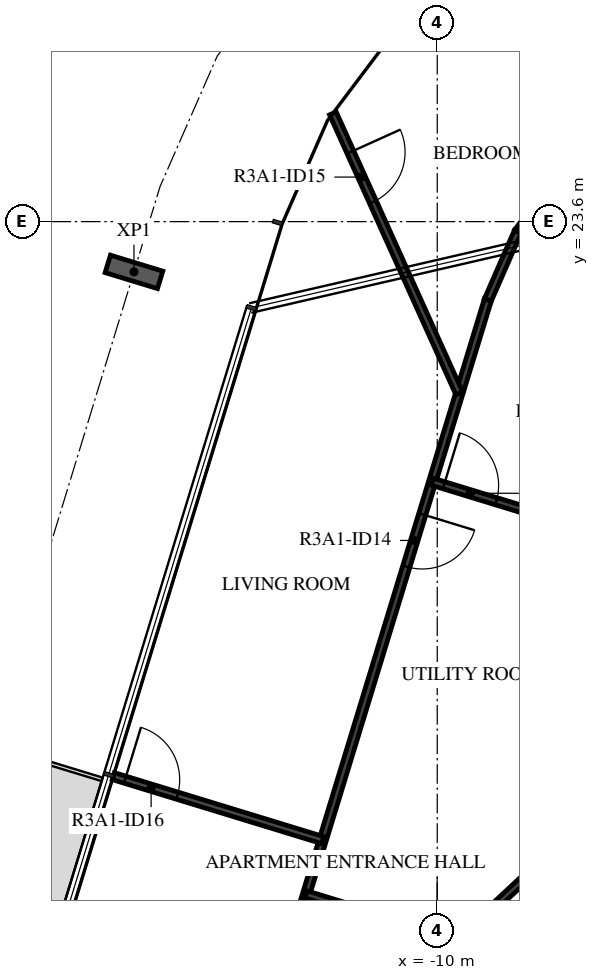
"""IFC4 building model, lengths in metres.
Left out: names, types, materials, properties, quantities, classifications, styles, units other than length and angle.
Written with IfcOpenShell. Run it as: python <this file> out.ifc"""

import sys

from ifc_helpers import new_model, si_unit, direction, frame, frame_2d, origin, origin_2d, place, context, subcontext, project, spatial, rectangle, i_section, extrude, element, fill, save


model = new_model("IFC4")
c1 = context("Model", 3, precision=1e-05, world=origin(), true_north=direction((0.0, 1.0)))
c2 = subcontext(c1, "Body", "Model", "MODEL_VIEW")
j1 = project(units=[si_unit("LENGTHUNIT", "METRE"), si_unit("PLANEANGLEUNIT", "RADIAN")], contexts=[c1])
p1 = place(None, origin())
s1 = spatial("IfcSite", under=j1, at=p1, CompositionType="ELEMENT")
p2 = place(p1, origin())
s2 = spatial("IfcBuilding", under=s1, at=p2, CompositionType="ELEMENT")
p3 = place(p2, frame((0.0, 0.0, 116.9)))
s3 = spatial("IfcBuildingStorey", under=s2, at=p3, CompositionType="ELEMENT", Elevation=116.9)
p4 = place(p3, frame((-14.987, 22.773, -0.38), z_axis=(0.0, 0.0, 1.0), x_axis=(0.29237190653, 0.956304694264, 0.0)))
e1 = element("IfcColumn", 1, at=p4, inside=s3, PredefinedType="COLUMN", context=c2, shape_type="SweptSolid", body=[
    extrude(i_section(OverallWidth=0.3, OverallDepth=0.9, WebThickness=0.019, FlangeThickness=0.035, FilletRadius=0.03, at=origin_2d()), origin(), (0.0, 0.0, 1.0), 3.5),
])
p5 = place(p3, frame((-6.659, 12.523, 0.0), z_axis=(0.0, 0.0, 1.0), x_axis=(-0.731350455479, -0.682001841105, 0.0)))
e2 = element("IfcWall", 2, at=p5, inside=s3, PredefinedType="STANDARD", context=c2, shape_type="SweptSolid", body=[
    extrude(rectangle(XDim=7.342, YDim=0.2, at=frame_2d((3.671, 0.0))), origin(), (0.0, 0.0, 1.0), 3.12),
])
p6 = place(p5, frame((4.2, 0.0, 0.0)))
e3 = element("IfcOpeningElement", 3, at=p6, cuts=e2, PredefinedType="OPENING", context=c2, shape_type="SweptSolid", body=[
    extrude(rectangle(XDim=1.0, YDim=2.1, at=frame_2d((0.5, 1.05))), frame((0.0, 0.11, 0.0), z_axis=(0.0, -1.0, 0.0), x_axis=(1.0, 0.0, 0.0)), (0.0, 0.0, 1.0), 0.22),
])
p7 = place(p3, frame((-7.388, 13.894, 0.0), z_axis=(0.0, 0.0, 1.0), x_axis=(-0.731357186721, -0.681994622729, 0.0)))
e4 = element("IfcWall", 4, at=p7, inside=s3, PredefinedType="PARTITIONING", context=c2, shape_type="SweptSolid", body=[
    extrude(rectangle(XDim=8.146, YDim=0.12, at=frame_2d((4.073, 0.0))), origin(), (0.0, 0.0, 1.0), 3.12),
])
p8 = place(p7, frame((3.509, 0.0, 0.0)))
e5 = element("IfcOpeningElement", 5, at=p8, cuts=e4, PredefinedType="OPENING", context=c2, shape_type="SweptSolid", body=[
    extrude(rectangle(XDim=0.8, YDim=2.1, at=frame_2d((0.4, 1.05))), frame((0.0, 0.07, 0.0), z_axis=(0.0, -1.0, 0.0), x_axis=(1.0, 0.0, 0.0)), (0.0, 0.0, 1.0), 0.14),
])
p9 = place(p3, frame((-8.065, 24.245, 0.0), z_axis=(0.0, 0.0, 1.0), x_axis=(-0.601959070304, -0.798526942363, 0.0)))
e6 = element("IfcWall", 6, at=p9, inside=s3, PredefinedType="PARTITIONING", context=c2, shape_type="SweptSolid", body=[
    extrude(rectangle(XDim=1.016, YDim=0.12, at=frame_2d((0.508, 0.0))), origin(), (0.0, 0.0, 1.0), 3.12),
])
p10 = place(p3, frame((-8.677, 23.433, 0.0), z_axis=(0.0, 0.0, 1.0), x_axis=(-0.401351130635, -0.915924270853, 0.0)))
e7 = element("IfcWall", 7, at=p10, inside=s3, PredefinedType="PARTITIONING", context=c2, shape_type="SweptSolid", body=[
    extrude(rectangle(XDim=1.227, YDim=0.12, at=frame_2d((0.614, 0.0))), origin(), (0.0, 0.0, 1.0), 3.12),
])
p11 = place(p3, frame((-9.169, 22.31, 0.0), z_axis=(0.0, 0.0, 1.0), x_axis=(-0.29236145486, -0.956307889601, 0.0)))
e8 = element("IfcWall", 8, at=p11, inside=s3, PredefinedType="PARTITIONING", context=c2, shape_type="SweptSolid", body=[
    extrude(rectangle(XDim=17.316, YDim=0.12, at=frame_2d((8.658, 0.0))), origin(), (0.0, 0.0, 1.0), 3.12),
])
p12 = place(p11, frame((3.683, 0.0, 0.0)))
e9 = element("IfcOpeningElement", 9, at=p12, cuts=e8, PredefinedType="OPENING", context=c2, shape_type="SweptSolid", body=[
    extrude(rectangle(XDim=0.9, YDim=2.1, at=frame_2d((0.45, 1.05))), frame((0.0, 0.07, 0.0), z_axis=(0.0, -1.0, 0.0), x_axis=(1.0, 0.0, 0.0)), (0.0, 0.0, 1.0), 0.14),
])
p13 = place(p3, frame((-10.082, 19.323, 0.0), z_axis=(0.0, 0.0, 1.0), x_axis=(0.956300011431, -0.292387222936, 0.0)))
e10 = element("IfcWall", 10, at=p13, inside=s3, PredefinedType="PARTITIONING", context=c2, shape_type="SweptSolid", body=[
    extrude(rectangle(XDim=6.324, YDim=0.12, at=frame_2d((3.162, 0.0))), origin(), (0.0, 0.0, 1.0), 3.12),
])
p14 = place(p13, frame((0.2, 0.0, 0.0)))
e11 = element("IfcOpeningElement", 11, at=p14, cuts=e10, PredefinedType="OPENING", context=c2, shape_type="SweptSolid", body=[
    extrude(rectangle(XDim=0.9, YDim=2.1, at=frame_2d((0.45, 1.05))), frame((0.0, 0.07, 0.0), z_axis=(0.0, -1.0, 0.0), x_axis=(1.0, 0.0, 0.0)), (0.0, 0.0, 1.0), 0.14),
])
p15 = place(p3, frame((-11.717, 25.381, 0.0), z_axis=(0.0, 0.0, 1.0), x_axis=(0.411493504767, -0.911412692217, 0.0)))
e12 = element("IfcWall", 12, at=p15, inside=s3, PredefinedType="PARTITIONING", context=c2, shape_type="SweptSolid", body=[
    extrude(rectangle(XDim=5.052, YDim=0.12, at=frame_2d((2.526, 0.0))), origin(), (0.0, 0.0, 1.0), 3.12),
])
p16 = place(p15, frame((0.7, 0.0, 0.0)))
e13 = element("IfcOpeningElement", 13, at=p16, cuts=e12, PredefinedType="OPENING", context=c2, shape_type="SweptSolid", body=[
    extrude(rectangle(XDim=0.9, YDim=2.1, at=frame_2d((0.45, 1.05))), frame((0.0, 0.07, 0.0), z_axis=(0.0, -1.0, 0.0), x_axis=(1.0, 0.0, 0.0)), (0.0, 0.0, 1.0), 0.14),
])
p17 = place(p3, frame((-12.157, 12.537, 0.0), z_axis=(0.0, 0.0, 1.0), x_axis=(0.956293441844, -0.292408708979, 0.0)))
e14 = element("IfcWall", 14, at=p17, inside=s3, PredefinedType="PARTITIONING", context=c2, shape_type="SweptSolid", body=[
    extrude(rectangle(XDim=2.609, YDim=0.12, at=frame_2d((1.305, 0.0))), origin(), (0.0, 0.0, 1.0), 3.12),
])
p18 = place(p3, frame((-15.327, 14.481, 0.0), z_axis=(0.0, 0.0, 1.0), x_axis=(0.956306810244, -0.292364985388, 0.0)))
e15 = element("IfcWall", 15, at=p18, inside=s3, PredefinedType="PARTITIONING", context=c2, shape_type="SweptSolid", body=[
    extrude(rectangle(XDim=3.6, YDim=0.12, at=frame_2d((1.8, 0.0))), origin(), (0.0, 0.0, 1.0), 2.73),
])
p19 = place(p18, frame((0.2, 0.0, 0.0)))
e16 = element("IfcOpeningElement", 16, at=p19, cuts=e15, PredefinedType="OPENING", context=c2, shape_type="SweptSolid", body=[
    extrude(rectangle(XDim=0.9, YDim=2.1, at=frame_2d((0.45, 1.05))), frame((0.0, 0.07, 0.0), z_axis=(0.0, -1.0, 0.0), x_axis=(1.0, 0.0, 0.0)), (0.0, 0.0, 1.0), 0.14),
])
p20 = place(p14, origin())
e17 = element("IfcDoor", 17, at=p20, inside=s3, OperationType="SINGLE_SWING_LEFT", PredefinedType="DOOR", context=c2, shape_type="SweptSolid", body=[
    extrude(rectangle(XDim=0.9, YDim=2.1, at=frame_2d((0.45, 1.05))), frame((0.0, 0.025, 0.0), z_axis=(0.0, -1.0, 0.0), x_axis=(1.0, 0.0, 0.0)), (0.0, 0.0, 1.0), 0.05),
])
fill(e11, e17)
p21 = place(p12, origin())
e18 = element("IfcDoor", 18, at=p21, inside=s3, OperationType="SINGLE_SWING_LEFT", PredefinedType="DOOR", context=c2, shape_type="SweptSolid", body=[
    extrude(rectangle(XDim=0.9, YDim=2.1, at=frame_2d((0.45, 1.05))), frame((0.0, 0.025, 0.0), z_axis=(0.0, -1.0, 0.0), x_axis=(1.0, 0.0, 0.0)), (0.0, 0.0, 1.0), 0.05),
])
fill(e9, e18)
p22 = place(p16, origin())
e19 = element("IfcDoor", 19, at=p22, inside=s3, OperationType="SINGLE_SWING_LEFT", PredefinedType="DOOR", context=c2, shape_type="SweptSolid", body=[
    extrude(rectangle(XDim=0.9, YDim=2.1, at=frame_2d((0.45, 1.05))), frame((0.0, 0.025, 0.0), z_axis=(0.0, -1.0, 0.0), x_axis=(1.0, 0.0, 0.0)), (0.0, 0.0, 1.0), 0.05),
])
fill(e13, e19)
p23 = place(p19, origin())
e20 = element("IfcDoor", 20, at=p23, inside=s3, OperationType="SINGLE_SWING_RIGHT", PredefinedType="DOOR", context=c2, shape_type="SweptSolid", body=[
    extrude(rectangle(XDim=0.9, YDim=2.1, at=frame_2d((0.45, 1.05))), frame((0.0, 0.025, 0.0), z_axis=(0.0, -1.0, 0.0), x_axis=(1.0, 0.0, 0.0)), (0.0, 0.0, 1.0), 0.05),
])
fill(e16, e20)
save(model, sys.argv[1])
